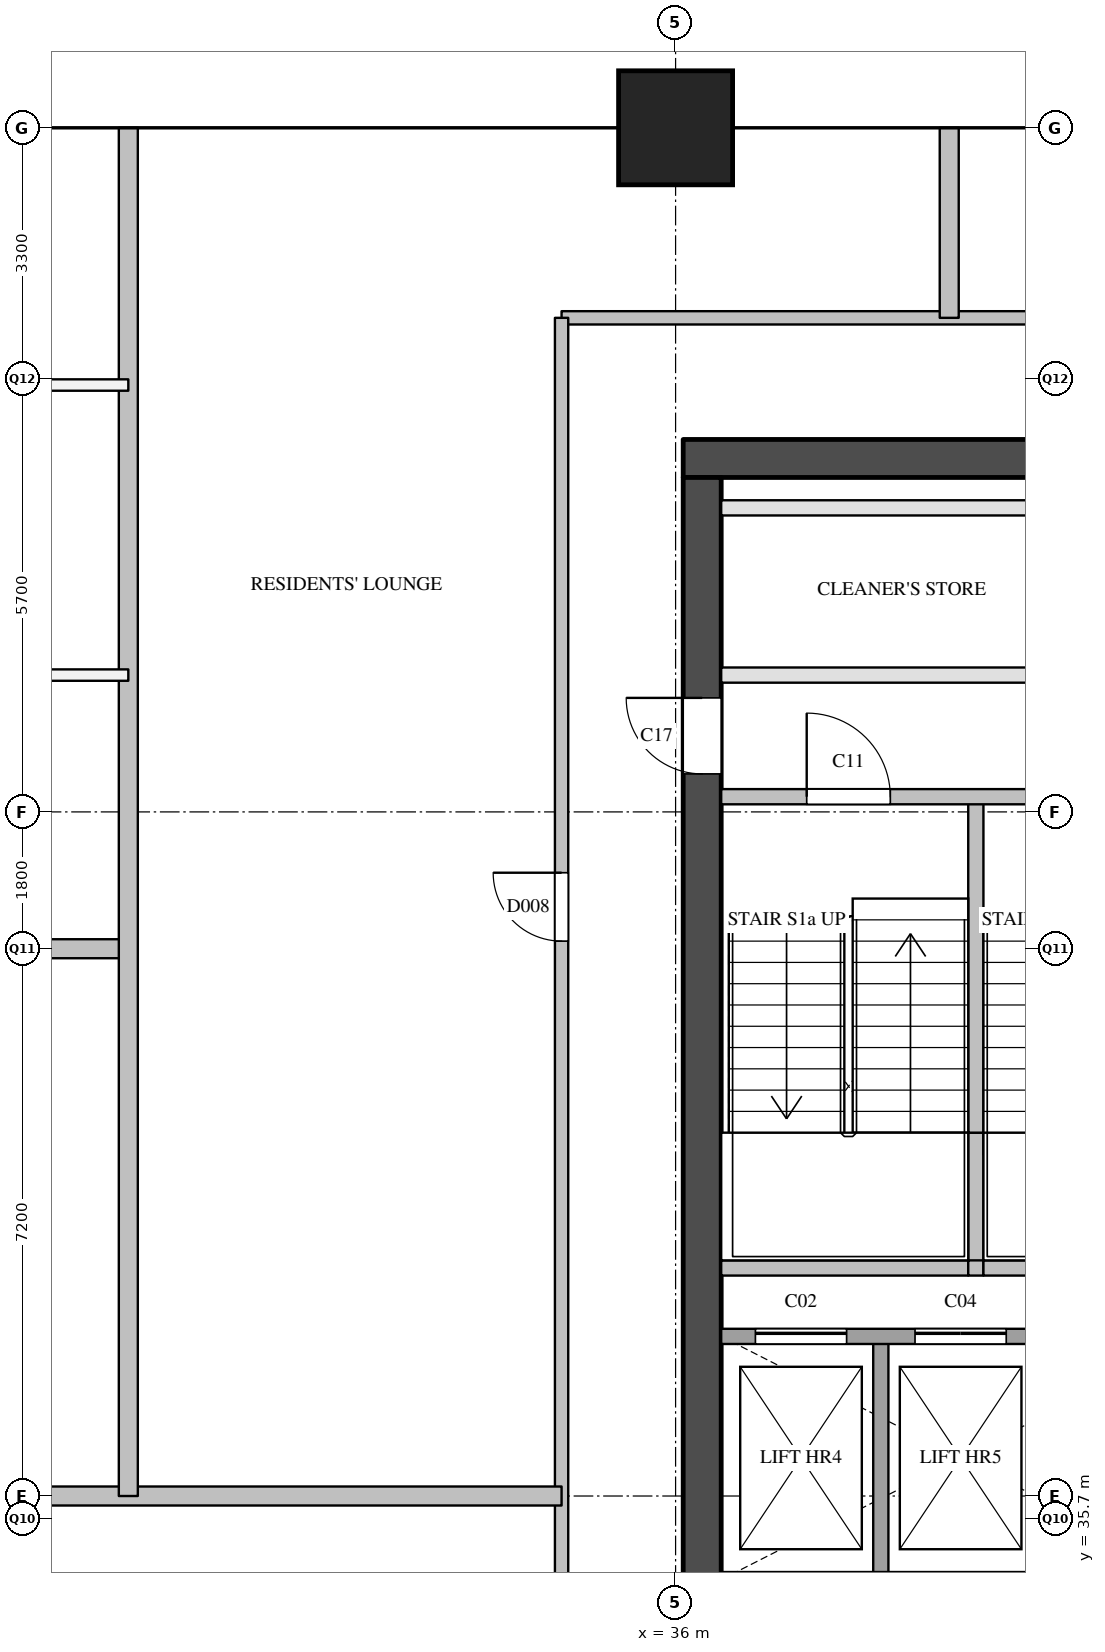
"""IFC4 building model, lengths in metres.
Left out: names, types, materials, properties, quantities, classifications, styles, units other than length and angle.
Written with IfcOpenShell. Run it as: python <this file> out.ifc"""

import sys

from ifc_helpers import new_model, si_unit, direction, frame, frame_2d, origin, origin_2d, place, context, subcontext, project, spatial, rectangle, extrude, element, fill, save


model = new_model("IFC4")
c1 = context("Model", 3, precision=1e-05, world=origin(), true_north=direction((0.0, 1.0)))
c2 = subcontext(c1, "Body", "Model", "MODEL_VIEW")
j1 = project(units=[si_unit("LENGTHUNIT", "METRE"), si_unit("PLANEANGLEUNIT", "RADIAN")], contexts=[c1])
p1 = place(None, origin())
s1 = spatial("IfcSite", under=j1, at=p1, CompositionType="ELEMENT")
p2 = place(p1, origin())
s2 = spatial("IfcBuilding", under=s1, at=p2, CompositionType="ELEMENT")
p3 = place(p2, frame((0.0, 0.0, 166.1)))
s3 = spatial("IfcBuildingStorey", under=s2, at=p3, CompositionType="ELEMENT", Elevation=166.1)
p4 = place(p3, frame((36.0, 54.0, 0.0), z_axis=(0.0, 0.0, 1.0), x_axis=(1.0, 0.0, 0.0)))
e1 = element("IfcColumn", 1, at=p4, inside=s3, PredefinedType="COLUMN", context=c2, shape_type="SweptSolid", body=[
    extrude(rectangle(XDim=1.5, YDim=1.5, at=origin_2d()), origin(), (0.0, 0.0, 1.0), 3.9),
])
p5 = place(p3, frame((36.1, 49.65, 0.0), z_axis=(0.0, 0.0, 1.0), x_axis=(1.0, 0.0, 0.0)))
e2 = element("IfcWall", 2, at=p5, inside=s3, PredefinedType="SHEAR", context=c2, shape_type="SweptSolid", body=[
    extrude(rectangle(XDim=12.2, YDim=0.5, at=frame_2d((6.1, 0.0))), origin(), (0.0, 0.0, 1.0), 3.6),
])
p6 = place(p3, frame((36.35, 29.1, 0.0), z_axis=(0.0, 0.0, 1.0), x_axis=(0.0, 1.0, 0.0)))
e3 = element("IfcWall", 3, at=p6, inside=s3, PredefinedType="SHEAR", context=c2, shape_type="SweptSolid", body=[
    extrude(rectangle(XDim=20.3, YDim=0.5, at=frame_2d((10.15, 0.0))), origin(), (0.0, 0.0, 1.0), 3.6),
])
p7 = place(p6, frame((3.6, 0.0, 0.0)))
e4 = element("IfcOpeningElement", 4, at=p7, cuts=e3, PredefinedType="OPENING", context=c2, shape_type="SweptSolid", body=[
    extrude(rectangle(XDim=1.8, YDim=2.1, at=frame_2d((0.9, 1.05))), frame((0.0, 0.26, 0.0), z_axis=(0.0, -1.0, 0.0), x_axis=(1.0, 0.0, 0.0)), (0.0, 0.0, 1.0), 0.52),
])
p8 = place(p6, frame((16.4, 0.0, 0.0)))
e5 = element("IfcOpeningElement", 5, at=p8, cuts=e3, PredefinedType="OPENING", context=c2, shape_type="SweptSolid", body=[
    extrude(rectangle(XDim=1.0, YDim=2.1, at=frame_2d((0.5, 1.05))), frame((0.0, 0.26, 0.0), z_axis=(0.0, -1.0, 0.0), x_axis=(1.0, 0.0, 0.0)), (0.0, 0.0, 1.0), 0.52),
])
p9 = place(p3, frame((38.7, 34.9, 0.0), z_axis=(0.0, 0.0, 1.0), x_axis=(0.0, 1.0, 0.0)))
e6 = element("IfcWall", 6, at=p9, inside=s3, PredefinedType="SOLIDWALL", context=c2, shape_type="SweptSolid", body=[
    extrude(rectangle(XDim=3.2, YDim=0.2, at=frame_2d((1.6, 0.0))), origin(), (0.0, 0.0, 1.0), 3.6),
])
p10 = place(p3, frame((39.95, 39.0, 0.0), z_axis=(0.0, 0.0, 1.0), x_axis=(0.0, 1.0, 0.0)))
e7 = element("IfcWall", 7, at=p10, inside=s3, PredefinedType="SOLIDWALL", context=c2, shape_type="SweptSolid", body=[
    extrude(rectangle(XDim=1.78, YDim=0.2, at=frame_2d((0.89, 0.0))), origin(), (0.0, 0.0, 1.0), 3.6),
])
p11 = place(p3, frame((39.95, 40.78, 0.0), z_axis=(0.0, 0.0, 1.0), x_axis=(0.0, 1.0, 0.0)))
e8 = element("IfcWall", 8, at=p11, inside=s3, PredefinedType="SOLIDWALL", context=c2, shape_type="SweptSolid", body=[
    extrude(rectangle(XDim=4.42, YDim=0.2, at=frame_2d((2.21, 0.0))), origin(), (0.0, 0.0, 1.0), 3.6),
])
p12 = place(p3, frame((36.6, 38.1, 0.0), z_axis=(0.0, 0.0, 1.0), x_axis=(1.0, 0.0, 0.0)))
e9 = element("IfcWall", 9, at=p12, inside=s3, PredefinedType="SOLIDWALL", context=c2, shape_type="SweptSolid", body=[
    extrude(rectangle(XDim=6.7, YDim=0.2, at=frame_2d((3.35, 0.0))), origin(), (0.0, 0.0, 1.0), 3.6),
])
p13 = place(p12, frame((0.45, 0.0, 0.0)))
e10 = element("IfcOpeningElement", 10, at=p13, cuts=e9, PredefinedType="OPENING", context=c2, shape_type="SweptSolid", body=[
    extrude(rectangle(XDim=1.2, YDim=2.1, at=frame_2d((0.6, 1.05))), frame((0.0, 0.11, 0.0), z_axis=(0.0, -1.0, 0.0), x_axis=(1.0, 0.0, 0.0)), (0.0, 0.0, 1.0), 0.22),
])
p14 = place(p12, frame((2.55, 0.0, 0.0)))
e11 = element("IfcOpeningElement", 11, at=p14, cuts=e9, PredefinedType="OPENING", context=c2, shape_type="SweptSolid", body=[
    extrude(rectangle(XDim=1.2, YDim=2.1, at=frame_2d((0.6, 1.05))), frame((0.0, 0.11, 0.0), z_axis=(0.0, -1.0, 0.0), x_axis=(1.0, 0.0, 0.0)), (0.0, 0.0, 1.0), 0.22),
])
p15 = place(p12, frame((4.65, 0.0, 0.0)))
e12 = element("IfcOpeningElement", 12, at=p15, cuts=e9, PredefinedType="OPENING", context=c2, shape_type="SweptSolid", body=[
    extrude(rectangle(XDim=1.2, YDim=2.1, at=frame_2d((0.6, 1.05))), frame((0.0, 0.11, 0.0), z_axis=(0.0, -1.0, 0.0), x_axis=(1.0, 0.0, 0.0)), (0.0, 0.0, 1.0), 0.22),
])
p16 = place(p3, frame((36.6, 39.0, 0.0), z_axis=(0.0, 0.0, 1.0), x_axis=(1.0, 0.0, 0.0)))
e13 = element("IfcWall", 13, at=p16, inside=s3, PredefinedType="SOLIDWALL", context=c2, shape_type="SweptSolid", body=[
    extrude(rectangle(XDim=3.25, YDim=0.2, at=frame_2d((1.625, 0.0))), origin(), (0.0, 0.0, 1.0), 3.6),
])
p17 = place(p3, frame((39.85, 39.0, 0.0), z_axis=(0.0, 0.0, 1.0), x_axis=(1.0, 0.0, 0.0)))
e14 = element("IfcWall", 14, at=p17, inside=s3, PredefinedType="SOLIDWALL", context=c2, shape_type="SweptSolid", body=[
    extrude(rectangle(XDim=0.2, YDim=0.2, at=frame_2d((0.1, 0.0))), origin(), (0.0, 0.0, 1.0), 3.6),
])
p18 = place(p3, frame((40.05, 39.0, 0.0), z_axis=(0.0, 0.0, 1.0), x_axis=(1.0, 0.0, 0.0)))
e15 = element("IfcWall", 15, at=p18, inside=s3, PredefinedType="SOLIDWALL", context=c2, shape_type="SweptSolid", body=[
    extrude(rectangle(XDim=3.15, YDim=0.2, at=frame_2d((1.575, 0.0))), origin(), (0.0, 0.0, 1.0), 3.6),
])
p19 = place(p3, frame((36.6, 45.2, 0.0), z_axis=(0.0, 0.0, 1.0), x_axis=(1.0, 0.0, 0.0)))
e16 = element("IfcWall", 16, at=p19, inside=s3, PredefinedType="SOLIDWALL", context=c2, shape_type="SweptSolid", body=[
    extrude(rectangle(XDim=10.05, YDim=0.2, at=frame_2d((5.025, 0.0))), origin(), (0.0, 0.0, 1.0), 3.6),
])
p20 = place(p19, frame((1.125, 0.0, 0.0)))
e17 = element("IfcOpeningElement", 17, at=p20, cuts=e16, PredefinedType="OPENING", context=c2, shape_type="SweptSolid", body=[
    extrude(rectangle(XDim=1.1, YDim=2.1, at=frame_2d((0.55, 1.05))), frame((0.0, 0.11, 0.0), z_axis=(0.0, -1.0, 0.0), x_axis=(1.0, 0.0, 0.0)), (0.0, 0.0, 1.0), 0.22),
])
p21 = place(p19, frame((4.475, 0.0, 0.0)))
e18 = element("IfcOpeningElement", 18, at=p21, cuts=e16, PredefinedType="OPENING", context=c2, shape_type="SweptSolid", body=[
    extrude(rectangle(XDim=1.1, YDim=2.1, at=frame_2d((0.55, 1.05))), frame((0.0, 0.11, 0.0), z_axis=(0.0, -1.0, 0.0), x_axis=(1.0, 0.0, 0.0)), (0.0, 0.0, 1.0), 0.22),
])
p22 = place(p19, frame((7.825, 0.0, 0.0)))
e19 = element("IfcOpeningElement", 19, at=p22, cuts=e16, PredefinedType="OPENING", context=c2, shape_type="SweptSolid", body=[
    extrude(rectangle(XDim=1.1, YDim=2.1, at=frame_2d((0.55, 1.05))), frame((0.0, 0.11, 0.0), z_axis=(0.0, -1.0, 0.0), x_axis=(1.0, 0.0, 0.0)), (0.0, 0.0, 1.0), 0.22),
])
p23 = place(p3, frame((36.6, 46.8, 0.0), z_axis=(0.0, 0.0, 1.0), x_axis=(1.0, 0.0, 0.0)))
e20 = element("IfcWall", 20, at=p23, inside=s3, PredefinedType="PARTITIONING", context=c2, shape_type="SweptSolid", body=[
    extrude(rectangle(XDim=11.2, YDim=0.2, at=frame_2d((5.6, 0.0))), origin(), (0.0, 0.0, 1.0), 3.6),
])
p24 = place(p23, frame((5.15, 0.0, 0.0)))
e21 = element("IfcOpeningElement", 21, at=p24, cuts=e20, PredefinedType="OPENING", context=c2, shape_type="SweptSolid", body=[
    extrude(rectangle(XDim=0.9, YDim=2.1, at=frame_2d((0.45, 1.05))), frame((0.0, 0.11, 0.0), z_axis=(0.0, -1.0, 0.0), x_axis=(1.0, 0.0, 0.0)), (0.0, 0.0, 1.0), 0.22),
])
p25 = place(p3, frame((36.6, 49.0, 0.0), z_axis=(0.0, 0.0, 1.0), x_axis=(1.0, 0.0, 0.0)))
e22 = element("IfcWall", 22, at=p25, inside=s3, PredefinedType="PARTITIONING", context=c2, shape_type="SweptSolid", body=[
    extrude(rectangle(XDim=11.2, YDim=0.2, at=frame_2d((5.6, 0.0))), origin(), (0.0, 0.0, 1.0), 3.6),
])
p26 = place(p3, frame((34.5, 51.5, 0.0), z_axis=(0.0, 0.0, 1.0), x_axis=(1.0, 0.0, 0.0)))
e23 = element("IfcWall", 23, at=p26, inside=s3, PredefinedType="PARTITIONING", context=c2, shape_type="SweptSolid", body=[
    extrude(rectangle(XDim=15.4, YDim=0.175, at=frame_2d((7.7, 0.0))), origin(), (0.0, 0.0, 1.0), 3.6),
])
p27 = place(p26, frame((9.637, 0.0, 0.0)))
e24 = element("IfcOpeningElement", 24, at=p27, cuts=e23, PredefinedType="OPENING", context=c2, shape_type="SweptSolid", body=[
    extrude(rectangle(XDim=0.9, YDim=2.1, at=frame_2d((0.45, 1.05))), frame((0.0, 0.097, 0.0), z_axis=(0.0, -1.0, 0.0), x_axis=(1.0, 0.0, 0.0)), (0.0, 0.0, 1.0), 0.195),
])
p28 = place(p3, frame((34.5, 28.5, 0.0), z_axis=(0.0, 0.0, 1.0), x_axis=(0.0, 1.0, 0.0)))
e25 = element("IfcWall", 25, at=p28, inside=s3, PredefinedType="PARTITIONING", context=c2, shape_type="SweptSolid", body=[
    extrude(rectangle(XDim=23.0, YDim=0.175, at=frame_2d((11.5, 0.0))), origin(), (0.0, 0.0, 1.0), 3.6),
])
p29 = place(p28, frame((3.3, 0.0, 0.0)))
e26 = element("IfcOpeningElement", 26, at=p29, cuts=e25, PredefinedType="OPENING", context=c2, shape_type="SweptSolid", body=[
    extrude(rectangle(XDim=0.9, YDim=2.1, at=frame_2d((0.45, 1.05))), frame((0.0, 0.097, 0.0), z_axis=(0.0, -1.0, 0.0), x_axis=(1.0, 0.0, 0.0)), (0.0, 0.0, 1.0), 0.195),
])
p30 = place(p28, frame((14.8, 0.0, 0.0)))
e27 = element("IfcOpeningElement", 27, at=p30, cuts=e25, PredefinedType="OPENING", context=c2, shape_type="SweptSolid", body=[
    extrude(rectangle(XDim=0.9, YDim=2.1, at=frame_2d((0.45, 1.05))), frame((0.0, 0.097, 0.0), z_axis=(0.0, -1.0, 0.0), x_axis=(1.0, 0.0, 0.0)), (0.0, 0.0, 1.0), 0.195),
])
p31 = place(p3, frame((21.9, 46.8, 0.0), z_axis=(0.0, 0.0, 1.0), x_axis=(1.0, 0.0, 0.0)))
e28 = element("IfcWall", 28, at=p31, inside=s3, PredefinedType="PARTITIONING", context=c2, shape_type="SweptSolid", body=[
    extrude(rectangle(XDim=6.9, YDim=0.15, at=frame_2d((3.45, 0.0))), origin(), (0.0, 0.0, 1.0), 2.6),
])
p32 = place(p31, frame((3.37, 0.0, 0.0)))
e29 = element("IfcOpeningElement", 29, at=p32, cuts=e28, PredefinedType="OPENING", context=c2, shape_type="SweptSolid", body=[
    extrude(rectangle(XDim=0.9, YDim=2.1, at=frame_2d((0.45, 1.05))), frame((0.0, 0.085, 0.0), z_axis=(0.0, -1.0, 0.0), x_axis=(1.0, 0.0, 0.0)), (0.0, 0.0, 1.0), 0.17),
])
p33 = place(p3, frame((21.9, 50.616, 0.0), z_axis=(0.0, 0.0, 1.0), x_axis=(1.0, 0.0, 0.0)))
e30 = element("IfcWall", 30, at=p33, inside=s3, PredefinedType="PARTITIONING", context=c2, shape_type="SweptSolid", body=[
    extrude(rectangle(XDim=6.9, YDim=0.15, at=frame_2d((3.45, 0.0))), origin(), (0.0, 0.0, 1.0), 2.6),
])
p34 = place(p33, frame((3.0, 0.0, 0.0)))
e31 = element("IfcOpeningElement", 31, at=p34, cuts=e30, PredefinedType="OPENING", context=c2, shape_type="SweptSolid", body=[
    extrude(rectangle(XDim=0.9, YDim=2.1, at=frame_2d((0.45, 1.05))), frame((0.0, 0.085, 0.0), z_axis=(0.0, -1.0, 0.0), x_axis=(1.0, 0.0, 0.0)), (0.0, 0.0, 1.0), 0.17),
])
p35 = place(p3, frame((19.5, 36.0, 0.0), z_axis=(0.0, 0.0, 1.0), x_axis=(1.0, 0.0, 0.0)))
e32 = element("IfcWall", 32, at=p35, inside=s3, PredefinedType="PARTITIONING", context=c2, shape_type="SweptSolid", body=[
    extrude(rectangle(XDim=15.0, YDim=0.25, at=frame_2d((7.5, 0.0))), origin(), (0.0, 0.0, 1.0), 3.6),
])
p36 = place(p3, frame((19.5, 43.2, 0.0), z_axis=(0.0, 0.0, 1.0), x_axis=(1.0, 0.0, 0.0)))
e33 = element("IfcWall", 33, at=p36, inside=s3, PredefinedType="PARTITIONING", context=c2, shape_type="SweptSolid", body=[
    extrude(rectangle(XDim=9.3, YDim=0.25, at=frame_2d((4.65, 0.0))), origin(), (0.0, 0.0, 1.0), 2.6),
])
p37 = place(p3, frame((28.8, 36.0, 0.0), z_axis=(0.0, 0.0, 1.0), x_axis=(0.0, 1.0, 0.0)))
e34 = element("IfcWall", 34, at=p37, inside=s3, PredefinedType="PARTITIONING", context=c2, shape_type="SweptSolid", body=[
    extrude(rectangle(XDim=18.0, YDim=0.25, at=frame_2d((9.0, 0.0))), origin(), (0.0, 0.0, 1.0), 2.6),
])
p38 = place(p3, frame((39.6, 51.5, 0.0), z_axis=(0.0, 0.0, 1.0), x_axis=(0.0, 1.0, 0.0)))
e35 = element("IfcWall", 35, at=p38, inside=s3, PredefinedType="PARTITIONING", context=c2, shape_type="SweptSolid", body=[
    extrude(rectangle(XDim=2.5, YDim=0.25, at=frame_2d((1.25, 0.0))), origin(), (0.0, 0.0, 1.0), 2.6),
])
p39 = place(p13, origin())
e36 = element("IfcDoor", 36, at=p39, inside=s3, OperationType="SLIDING_TO_LEFT", PredefinedType="DOOR", context=c2, shape_type="SweptSolid", body=[
    extrude(rectangle(XDim=1.2, YDim=2.1, at=frame_2d((0.6, 1.05))), frame((0.0, 0.025, 0.0), z_axis=(0.0, -1.0, 0.0), x_axis=(1.0, 0.0, 0.0)), (0.0, 0.0, 1.0), 0.05),
])
fill(e10, e36)
p40 = place(p14, origin())
e37 = element("IfcDoor", 37, at=p40, inside=s3, OperationType="SLIDING_TO_LEFT", PredefinedType="DOOR", context=c2, shape_type="SweptSolid", body=[
    extrude(rectangle(XDim=1.2, YDim=2.1, at=frame_2d((0.6, 1.05))), frame((0.0, 0.025, 0.0), z_axis=(0.0, -1.0, 0.0), x_axis=(1.0, 0.0, 0.0)), (0.0, 0.0, 1.0), 0.05),
])
fill(e11, e37)
p41 = place(p20, origin())
e38 = element("IfcDoor", 38, at=p41, inside=s3, OperationType="SINGLE_SWING_LEFT", PredefinedType="DOOR", context=c2, shape_type="SweptSolid", body=[
    extrude(rectangle(XDim=1.1, YDim=2.1, at=frame_2d((0.55, 1.05))), frame((0.0, 0.025, 0.0), z_axis=(0.0, -1.0, 0.0), x_axis=(1.0, 0.0, 0.0)), (0.0, 0.0, 1.0), 0.05),
])
fill(e17, e38)
p42 = place(p8, origin())
e39 = element("IfcDoor", 39, at=p42, inside=s3, OperationType="SINGLE_SWING_RIGHT", PredefinedType="DOOR", context=c2, shape_type="SweptSolid", body=[
    extrude(rectangle(XDim=1.0, YDim=2.1, at=frame_2d((0.5, 1.05))), frame((0.0, 0.025, 0.0), z_axis=(0.0, -1.0, 0.0), x_axis=(1.0, 0.0, 0.0)), (0.0, 0.0, 1.0), 0.05),
])
fill(e5, e39)
p43 = place(p30, origin())
e40 = element("IfcDoor", 40, at=p43, inside=s3, OperationType="SINGLE_SWING_RIGHT", PredefinedType="DOOR", context=c2, shape_type="SweptSolid", body=[
    extrude(rectangle(XDim=0.9, YDim=2.1, at=frame_2d((0.45, 1.05))), frame((0.0, 0.025, 0.0), z_axis=(0.0, -1.0, 0.0), x_axis=(1.0, 0.0, 0.0)), (0.0, 0.0, 1.0), 0.05),
])
fill(e27, e40)
save(model, sys.argv[1])
